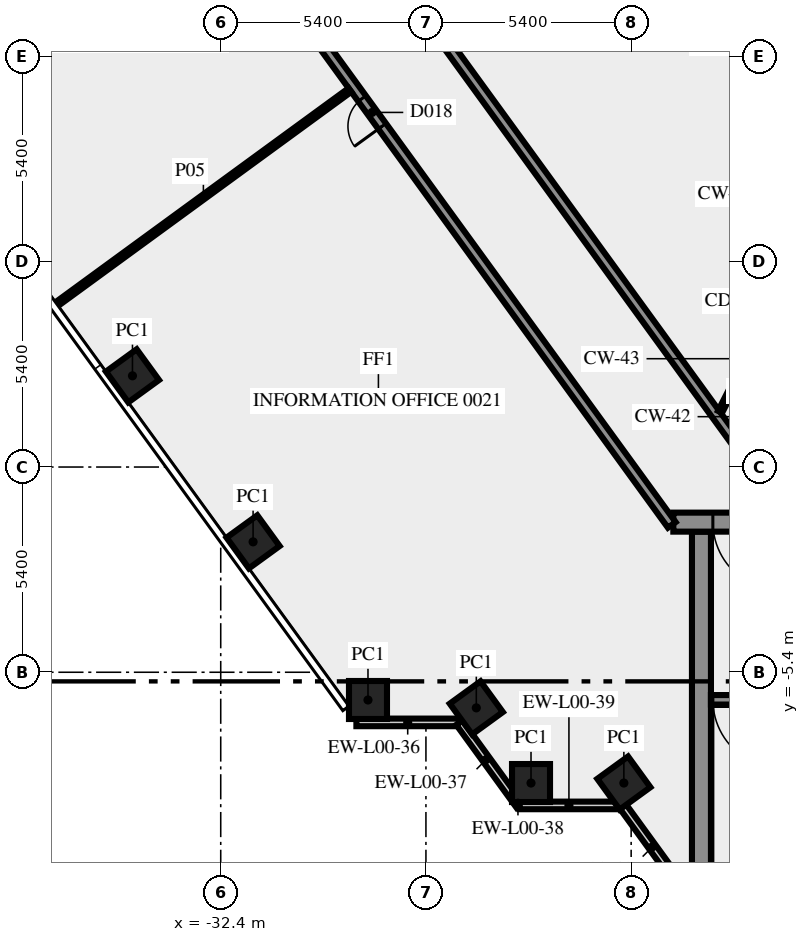
"""IFC4 building model, lengths in metres.
Left out: names, types, materials, properties, quantities, classifications, styles, units other than length and angle.
Written with IfcOpenShell. Run it as: python <this file> out.ifc"""

import sys

from ifc_helpers import new_model, si_unit, direction, frame, frame_2d, origin, origin_2d, place, context, subcontext, project, spatial, rectangle, extrude, element, fill, save


model = new_model("IFC4")
c1 = context("Model", 3, precision=1e-05, world=origin(), true_north=direction((0.0, 1.0)))
c2 = subcontext(c1, "Body", "Model", "MODEL_VIEW")
j1 = project(units=[si_unit("LENGTHUNIT", "METRE"), si_unit("PLANEANGLEUNIT", "RADIAN")], contexts=[c1])
p1 = place(None, origin())
s1 = spatial("IfcSite", under=j1, at=p1, CompositionType="ELEMENT")
p2 = place(p1, origin())
s2 = spatial("IfcBuilding", under=s1, at=p2, CompositionType="ELEMENT")
p3 = place(p2, origin())
s3 = spatial("IfcBuildingStorey", under=s2, at=p3, CompositionType="ELEMENT", Elevation=0.0)
for number, where, z_axis, x_axis in (
    (1, (-34.722, 2.4, 0.0), (0.0, 0.0, 1.0), (0.588, -0.809, 0.0)),
    (2, (-31.548, -1.969, 0.0), (0.0, 0.0, 1.0), (0.588, -0.809, 0.0)),
    (3, (-28.525, -6.13, 0.0), (0.0, 0.0, 1.0), (1.0, 0.0, 0.0)),
    (4, (-25.674, -6.337, 0.0), (0.0, 0.0, 1.0), (0.588, -0.809, 0.0)),
    (5, (-24.235, -8.315, 0.0), (0.0, 0.0, 1.0), (1.0, 0.0, 0.0)),
    (6, (-21.792, -8.315, 0.0), (0.0, 0.0, 1.0), (0.588, -0.809, 0.0)),
):
    element("IfcColumn", number, at=place(p3, frame(where, z_axis=z_axis, x_axis=x_axis)), inside=s3, PredefinedType="COLUMN", context=c2, shape_type="SweptSolid", body=[
        extrude(rectangle(XDim=1.0, YDim=1.0, at=origin_2d()), origin(), (0.0, 0.0, 1.0), 5.6),
    ])
p4 = place(p3, frame((-28.83, -6.719, 0.0), z_axis=(0.0, 0.0, 1.0), x_axis=(1.0, 0.0, 0.0)))
e7 = element("IfcWall", 7, at=p4, inside=s3, PredefinedType="SOLIDWALL", context=c2, shape_type="SweptSolid", body=[
    extrude(rectangle(XDim=2.7, YDim=0.2, at=frame_2d((1.35, 0.0))), origin(), (0.0, 0.0, 1.0), 5.6),
])
p5 = place(p3, frame((-26.12, -6.724, 0.0), z_axis=(0.0, 0.0, 1.0), x_axis=(0.587706476352, -0.809074222587, 0.0)))
e8 = element("IfcWall", 8, at=p5, inside=s3, PredefinedType="SOLIDWALL", context=c2, shape_type="SweptSolid", body=[
    extrude(rectangle(XDim=2.403, YDim=0.2, at=frame_2d((1.202, 0.0))), origin(), (0.0, 0.0, 1.0), 5.6),
])
p6 = place(p3, frame((-24.624, -8.784, 0.0), z_axis=(0.0, 0.0, 1.0), x_axis=(0.586760218966, -0.809760733451, 0.0)))
e9 = element("IfcWall", 9, at=p6, inside=s3, PredefinedType="SOLIDWALL", context=c2, shape_type="SweptSolid", body=[
    extrude(rectangle(XDim=0.154, YDim=0.2, at=frame_2d((0.077, 0.0))), origin(), (0.0, 0.0, 1.0), 5.6),
])
p7 = place(p3, frame((-24.531, -8.904, 0.0), z_axis=(0.0, 0.0, 1.0), x_axis=(1.0, 0.0, 0.0)))
e10 = element("IfcWall", 10, at=p7, inside=s3, PredefinedType="SOLIDWALL", context=c2, shape_type="SweptSolid", body=[
    extrude(rectangle(XDim=2.587, YDim=0.2, at=frame_2d((1.294, 0.0))), origin(), (0.0, 0.0, 1.0), 5.6),
])
p8 = place(p3, frame((-21.833, -8.909, 0.0), z_axis=(0.0, 0.0, 1.0), x_axis=(0.587766567315, -0.809030569476, 0.0)))
e11 = element("IfcWall", 11, at=p8, inside=s3, PredefinedType="SOLIDWALL", context=c2, shape_type="SweptSolid", body=[
    extrude(rectangle(XDim=2.688, YDim=0.2, at=frame_2d((1.344, 0.0))), origin(), (0.0, 0.0, 1.0), 5.6),
])
p9 = place(p3, frame((-19.75, -11.0, 0.0), z_axis=(0.0, 0.0, 1.0), x_axis=(0.0, 1.0, 0.0)))
e12 = element("IfcWall", 12, at=p9, inside=s3, PredefinedType="SHEAR", context=c2, shape_type="SweptSolid", body=[
    extrude(rectangle(XDim=9.3, YDim=0.5, at=frame_2d((4.65, 0.0))), origin(), (0.0, 0.0, 1.0), 5.6),
])
p10 = place(p3, frame((-11.45, -6.125, 0.0), z_axis=(0.0, 0.0, 1.0), x_axis=(-1.0, 0.0, 0.0)))
e13 = element("IfcWall", 13, at=p10, inside=s3, PredefinedType="SHEAR", context=c2, shape_type="SweptSolid", body=[
    extrude(rectangle(XDim=8.05, YDim=0.25, at=frame_2d((4.025, 0.0))), origin(), (0.0, 0.0, 1.0), 5.6),
])
p11 = place(p10, frame((6.2, 0.0, 0.0)))
e14 = element("IfcOpeningElement", 14, at=p11, cuts=e13, PredefinedType="OPENING", context=c2, shape_type="SweptSolid", body=[
    extrude(rectangle(XDim=1.8, YDim=2.1, at=frame_2d((0.9, 1.05))), frame((0.0, 0.135, 0.0), z_axis=(0.0, -1.0, 0.0), x_axis=(1.0, 0.0, 0.0)), (0.0, 0.0, 1.0), 0.27),
])
p12 = place(p3, frame((20.49, -1.45, 0.0), z_axis=(0.0, 0.0, 1.0), x_axis=(-1.0, 0.0, 0.0)))
e15 = element("IfcWall", 15, at=p12, inside=s3, PredefinedType="SHEAR", context=c2, shape_type="SweptSolid", body=[
    extrude(rectangle(XDim=40.98, YDim=0.5, at=frame_2d((20.49, 0.0))), origin(), (0.0, 0.0, 1.0), 5.6),
])
p13 = place(p12, frame((38.14, 0.0, 0.0)))
e16 = element("IfcOpeningElement", 16, at=p13, cuts=e15, PredefinedType="OPENING", context=c2, shape_type="SweptSolid", body=[
    extrude(rectangle(XDim=1.8, YDim=2.1, at=frame_2d((0.9, 1.05))), frame((0.0, 0.26, 0.0), z_axis=(0.0, -1.0, 0.0), x_axis=(1.0, 0.0, 0.0)), (0.0, 0.0, 1.0), 0.52),
])
p14 = place(p12, frame((35.89, 0.0, 0.0)))
e17 = element("IfcOpeningElement", 17, at=p14, cuts=e15, PredefinedType="OPENING", context=c2, shape_type="SweptSolid", body=[
    extrude(rectangle(XDim=0.9, YDim=2.1, at=frame_2d((0.45, 1.05))), frame((0.0, 0.26, 0.0), z_axis=(0.0, -1.0, 0.0), x_axis=(1.0, 0.0, 0.0)), (0.0, 0.0, 1.0), 0.52),
])
p15 = place(p12, frame((32.94, 0.0, 0.0)))
e18 = element("IfcOpeningElement", 18, at=p15, cuts=e15, PredefinedType="OPENING", context=c2, shape_type="SweptSolid", body=[
    extrude(rectangle(XDim=0.9, YDim=2.1, at=frame_2d((0.45, 1.05))), frame((0.0, 0.26, 0.0), z_axis=(0.0, -1.0, 0.0), x_axis=(1.0, 0.0, 0.0)), (0.0, 0.0, 1.0), 0.52),
])
p16 = place(p12, frame((21.765, 0.0, 0.0)))
e19 = element("IfcOpeningElement", 19, at=p16, cuts=e15, PredefinedType="OPENING", context=c2, shape_type="SweptSolid", body=[
    extrude(rectangle(XDim=2.0, YDim=2.1, at=frame_2d((1.0, 1.05))), frame((0.0, 0.26, 0.0), z_axis=(0.0, -1.0, 0.0), x_axis=(1.0, 0.0, 0.0)), (0.0, 0.0, 1.0), 0.52),
])
p17 = place(p12, frame((7.14, 0.0, 0.0)))
e20 = element("IfcOpeningElement", 20, at=p17, cuts=e15, PredefinedType="OPENING", context=c2, shape_type="SweptSolid", body=[
    extrude(rectangle(XDim=0.9, YDim=2.1, at=frame_2d((0.45, 1.05))), frame((0.0, 0.26, 0.0), z_axis=(0.0, -1.0, 0.0), x_axis=(1.0, 0.0, 0.0)), (0.0, 0.0, 1.0), 0.52),
])
p18 = place(p12, frame((5.028, 0.0, 0.0)))
e21 = element("IfcOpeningElement", 21, at=p18, cuts=e15, PredefinedType="OPENING", context=c2, shape_type="SweptSolid", body=[
    extrude(rectangle(XDim=0.8, YDim=2.1, at=frame_2d((0.4, 1.05))), frame((0.0, 0.26, 0.0), z_axis=(0.0, -1.0, 0.0), x_axis=(1.0, 0.0, 0.0)), (0.0, 0.0, 1.0), 0.52),
])
p19 = place(p12, frame((3.452, 0.0, 0.0)))
e22 = element("IfcOpeningElement", 22, at=p19, cuts=e15, PredefinedType="OPENING", context=c2, shape_type="SweptSolid", body=[
    extrude(rectangle(XDim=0.8, YDim=2.1, at=frame_2d((0.4, 1.05))), frame((0.0, 0.26, 0.0), z_axis=(0.0, -1.0, 0.0), x_axis=(1.0, 0.0, 0.0)), (0.0, 0.0, 1.0), 0.52),
])
p20 = place(p12, frame((1.04, 0.0, 0.0)))
e23 = element("IfcOpeningElement", 23, at=p20, cuts=e15, PredefinedType="OPENING", context=c2, shape_type="SweptSolid", body=[
    extrude(rectangle(XDim=1.8, YDim=2.1, at=frame_2d((0.9, 1.05))), frame((0.0, 0.26, 0.0), z_axis=(0.0, -1.0, 0.0), x_axis=(1.0, 0.0, 0.0)), (0.0, 0.0, 1.0), 0.52),
])
p21 = place(p3, frame((-20.531, -1.523, 0.0), z_axis=(0.0, 0.0, 1.0), x_axis=(-0.587784522481, 0.809017524614, 0.0)))
e24 = element("IfcWall", 24, at=p21, inside=s3, PredefinedType="SOLIDWALL", context=c2, shape_type="SweptSolid", body=[
    extrude(rectangle(XDim=49.912, YDim=0.25, at=frame_2d((24.956, 0.0))), origin(), (0.0, 0.0, 1.0), 5.6),
])
p22 = place(p21, frame((30.765, 0.0, 0.0)))
e25 = element("IfcOpeningElement", 25, at=p22, cuts=e24, PredefinedType="OPENING", context=c2, shape_type="SweptSolid", body=[
    extrude(rectangle(XDim=0.9, YDim=2.1, at=frame_2d((0.45, 1.05))), frame((0.0, 0.135, 0.0), z_axis=(0.0, -1.0, 0.0), x_axis=(1.0, 0.0, 0.0)), (0.0, 0.0, 1.0), 0.27),
])
p23 = place(p21, frame((22.416, 0.0, 0.0)))
e26 = element("IfcOpeningElement", 26, at=p23, cuts=e24, PredefinedType="OPENING", context=c2, shape_type="SweptSolid", body=[
    extrude(rectangle(XDim=0.9, YDim=2.1, at=frame_2d((0.45, 1.05))), frame((0.0, 0.135, 0.0), z_axis=(0.0, -1.0, 0.0), x_axis=(1.0, 0.0, 0.0)), (0.0, 0.0, 1.0), 0.27),
])
p24 = place(p21, frame((12.966, 0.0, 0.0)))
e27 = element("IfcOpeningElement", 27, at=p24, cuts=e24, PredefinedType="OPENING", context=c2, shape_type="SweptSolid", body=[
    extrude(rectangle(XDim=0.9, YDim=2.1, at=frame_2d((0.45, 1.05))), frame((0.0, 0.135, 0.0), z_axis=(0.0, -1.0, 0.0), x_axis=(1.0, 0.0, 0.0)), (0.0, 0.0, 1.0), 0.27),
])
p25 = place(p21, frame((29.016, 0.0, 0.0)))
e28 = element("IfcOpeningElement", 28, at=p25, cuts=e24, PredefinedType="OPENING", context=c2, shape_type="SweptSolid", body=[
    extrude(rectangle(XDim=0.9, YDim=2.1, at=frame_2d((0.45, 1.05))), frame((0.0, 0.135, 0.0), z_axis=(0.0, -1.0, 0.0), x_axis=(1.0, 0.0, 0.0)), (0.0, 0.0, 1.0), 0.27),
])
p26 = place(p3, frame((-37.232, 25.972, 0.0), z_axis=(0.0, 0.0, 1.0), x_axis=(0.587786323093, -0.809016216391, 0.0)))
e29 = element("IfcWall", 29, at=p26, inside=s3, PredefinedType="SOLIDWALL", context=c2, shape_type="SweptSolid", body=[
    extrude(rectangle(XDim=33.493, YDim=0.25, at=frame_2d((16.747, 0.0))), origin(), (0.0, 0.0, 1.0), 5.6),
])
p27 = place(p26, frame((6.462, 0.0, 0.0)))
e30 = element("IfcOpeningElement", 30, at=p27, cuts=e29, PredefinedType="OPENING", context=c2, shape_type="SweptSolid", body=[
    extrude(rectangle(XDim=1.8, YDim=2.1, at=frame_2d((0.9, 1.05))), frame((0.0, 0.135, 0.0), z_axis=(0.0, -1.0, 0.0), x_axis=(1.0, 0.0, 0.0)), (0.0, 0.0, 1.0), 0.27),
])
p28 = place(p26, frame((15.085, 0.0, 0.0)))
e31 = element("IfcOpeningElement", 31, at=p28, cuts=e29, PredefinedType="OPENING", context=c2, shape_type="SweptSolid", body=[
    extrude(rectangle(XDim=0.9, YDim=2.1, at=frame_2d((0.45, 1.05))), frame((0.0, 0.135, 0.0), z_axis=(0.0, -1.0, 0.0), x_axis=(1.0, 0.0, 0.0)), (0.0, 0.0, 1.0), 0.27),
])
p29 = place(p3, frame((-36.712, 4.288, 0.0), z_axis=(0.0, 0.0, 1.0), x_axis=(0.807606997933, 0.589721067023, 0.0)))
e32 = element("IfcWall", 32, at=p29, inside=s3, PredefinedType="PARTITIONING", context=c2, shape_type="SweptSolid", body=[
    extrude(rectangle(XDim=9.55, YDim=0.12, at=frame_2d((4.775, 0.0))), origin(), (0.0, 0.0, 1.0), 4.6),
])
p30 = place(p3, frame((-19.261, 1.45, 0.0), z_axis=(0.0, 0.0, 1.0), x_axis=(0.453950796792, 0.891026752736, 0.0)))
e33 = element("IfcWall", 33, at=p30, inside=s3, PredefinedType="PARTITIONING", context=c2, shape_type="SweptSolid", body=[
    extrude(rectangle(XDim=2.778, YDim=0.12, at=frame_2d((1.389, 0.0))), origin(), (0.0, 0.0, 1.0), 5.6),
])
p31 = place(p11, origin())
e34 = element("IfcDoor", 34, at=p31, inside=s3, OperationType="DOUBLE_DOOR_SINGLE_SWING", PredefinedType="DOOR", context=c2, shape_type="SweptSolid", body=[
    extrude(rectangle(XDim=1.8, YDim=2.1, at=frame_2d((0.9, 1.05))), frame((0.0, 0.025, 0.0), z_axis=(0.0, -1.0, 0.0), x_axis=(1.0, 0.0, 0.0)), (0.0, 0.0, 1.0), 0.05),
])
fill(e14, e34)
p32 = place(p13, origin())
e35 = element("IfcDoor", 35, at=p32, inside=s3, OperationType="DOUBLE_DOOR_SINGLE_SWING", PredefinedType="DOOR", context=c2, shape_type="SweptSolid", body=[
    extrude(rectangle(XDim=1.8, YDim=2.1, at=frame_2d((0.9, 1.05))), frame((0.0, 0.025, 0.0), z_axis=(0.0, -1.0, 0.0), x_axis=(1.0, 0.0, 0.0)), (0.0, 0.0, 1.0), 0.05),
])
fill(e16, e35)
p33 = place(p24, origin())
e36 = element("IfcDoor", 36, at=p33, inside=s3, OperationType="SINGLE_SWING_RIGHT", PredefinedType="DOOR", context=c2, shape_type="SweptSolid", body=[
    extrude(rectangle(XDim=0.9, YDim=2.1, at=frame_2d((0.45, 1.05))), frame((0.0, 0.025, 0.0), z_axis=(0.0, -1.0, 0.0), x_axis=(1.0, 0.0, 0.0)), (0.0, 0.0, 1.0), 0.05),
])
fill(e27, e36)
save(model, sys.argv[1])
